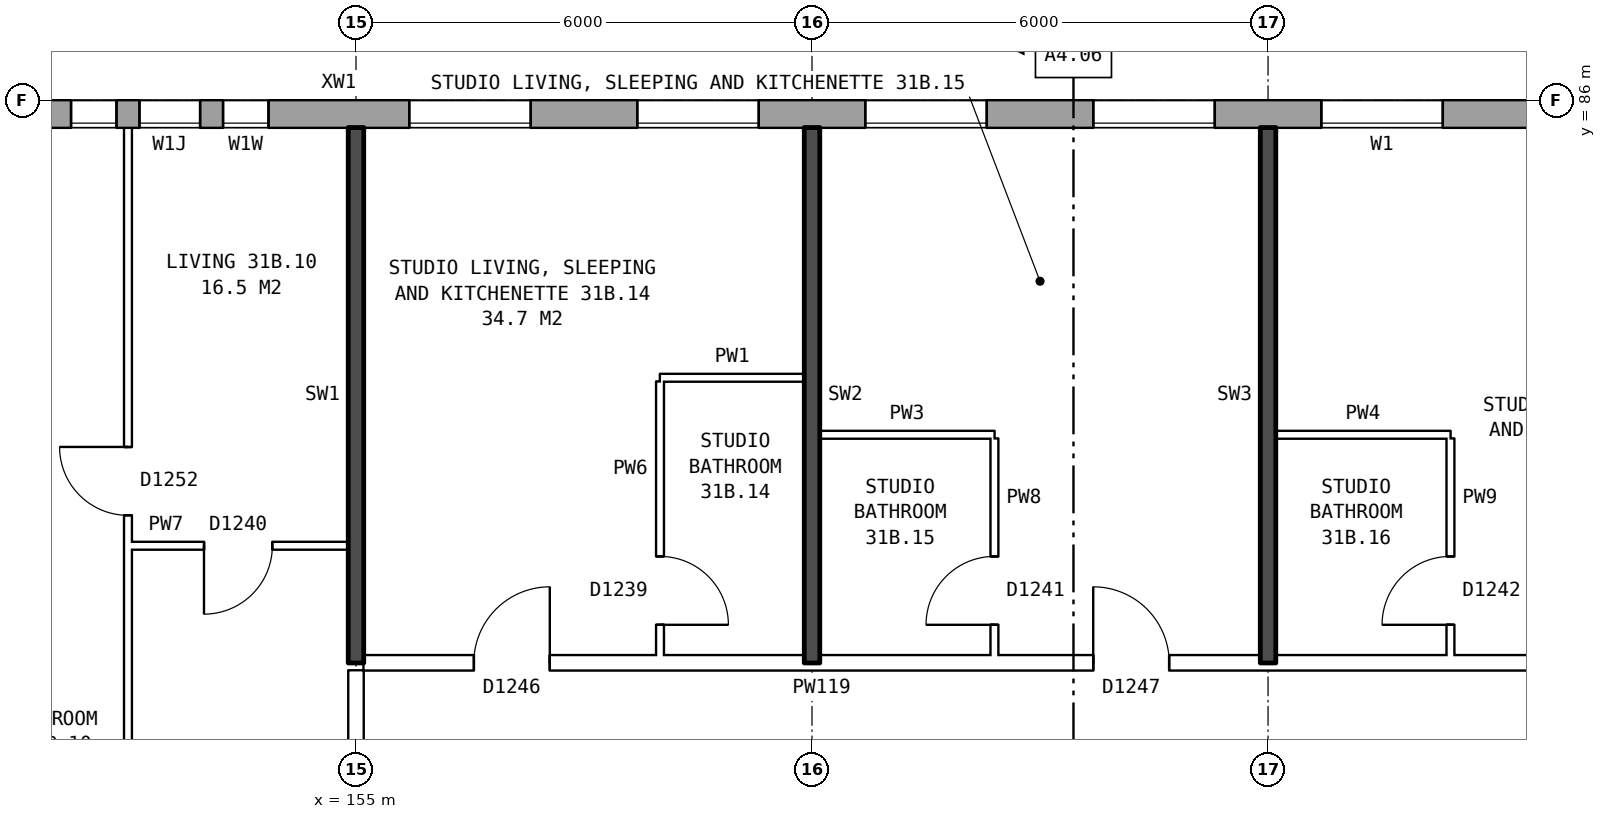
"""IFC4 building model, lengths in metres.
Left out: names, types, materials, properties, quantities, classifications, styles, units other than length and angle.
Written with IfcOpenShell. Run it as: python <this file> out.ifc"""

import sys

from ifc_helpers import new_model, si_unit, direction, frame, frame_2d, origin, place, context, subcontext, project, spatial, rectangle, extrude, element, fill, save


model = new_model("IFC4")
c1 = context("Model", 3, precision=1e-05, world=origin(), true_north=direction((0.0, 1.0)))
c2 = subcontext(c1, "Body", "Model", "MODEL_VIEW")
j1 = project(units=[si_unit("LENGTHUNIT", "METRE"), si_unit("PLANEANGLEUNIT", "RADIAN")], contexts=[c1])
p1 = place(None, origin())
s1 = spatial("IfcSite", under=j1, at=p1, CompositionType="ELEMENT")
p2 = place(p1, origin())
s2 = spatial("IfcBuilding", under=s1, at=p2, CompositionType="ELEMENT")
p3 = place(p2, frame((0.0, 0.0, 111.9)))
s3 = spatial("IfcBuildingStorey", under=s2, at=p3, CompositionType="ELEMENT", Elevation=111.9)
p4 = place(p3, frame((170.925, 85.82, 0.0), z_axis=(0.0, 0.0, 1.0), x_axis=(-1.0, 0.0, 0.0)))
e1 = element("IfcWall", 1, at=p4, inside=s3, PredefinedType="STANDARD", context=c2, shape_type="SweptSolid", body=[
    extrude(rectangle(XDim=36.851, YDim=0.36, at=frame_2d((18.425, 0.0))), origin(), (0.0, 0.0, 1.0), 2.85),
])
p5 = place(p4, frame((1.625, 0.0, 0.8)))
e2 = element("IfcOpeningElement", 2, at=p5, cuts=e1, PredefinedType="OPENING", context=c2, shape_type="SweptSolid", body=[
    extrude(rectangle(XDim=1.6, YDim=1.8, at=frame_2d((0.8, 0.9))), frame((0.0, 0.19, 0.0), z_axis=(0.0, -1.0, 0.0), x_axis=(1.0, 0.0, 0.0)), (0.0, 0.0, 1.0), 0.38),
])
p6 = place(p4, frame((4.625, 0.0, 0.8)))
e3 = element("IfcOpeningElement", 3, at=p6, cuts=e1, PredefinedType="OPENING", context=c2, shape_type="SweptSolid", body=[
    extrude(rectangle(XDim=1.6, YDim=1.8, at=frame_2d((0.8, 0.9))), frame((0.0, 0.19, 0.0), z_axis=(0.0, -1.0, 0.0), x_axis=(1.0, 0.0, 0.0)), (0.0, 0.0, 1.0), 0.38),
])
p7 = place(p4, frame((7.625, 0.0, 0.8)))
e4 = element("IfcOpeningElement", 4, at=p7, cuts=e1, PredefinedType="OPENING", context=c2, shape_type="SweptSolid", body=[
    extrude(rectangle(XDim=1.6, YDim=1.8, at=frame_2d((0.8, 0.9))), frame((0.0, 0.19, 0.0), z_axis=(0.0, -1.0, 0.0), x_axis=(1.0, 0.0, 0.0)), (0.0, 0.0, 1.0), 0.38),
])
p8 = place(p4, frame((10.625, 0.0, 0.8)))
e5 = element("IfcOpeningElement", 5, at=p8, cuts=e1, PredefinedType="OPENING", context=c2, shape_type="SweptSolid", body=[
    extrude(rectangle(XDim=1.6, YDim=1.8, at=frame_2d((0.8, 0.9))), frame((0.0, 0.19, 0.0), z_axis=(0.0, -1.0, 0.0), x_axis=(1.0, 0.0, 0.0)), (0.0, 0.0, 1.0), 0.38),
])
p9 = place(p4, frame((13.625, 0.0, 0.8)))
e6 = element("IfcOpeningElement", 6, at=p9, cuts=e1, PredefinedType="OPENING", context=c2, shape_type="SweptSolid", body=[
    extrude(rectangle(XDim=1.6, YDim=1.8, at=frame_2d((0.8, 0.9))), frame((0.0, 0.19, 0.0), z_axis=(0.0, -1.0, 0.0), x_axis=(1.0, 0.0, 0.0)), (0.0, 0.0, 1.0), 0.38),
])
p10 = place(p4, frame((17.075, 0.0, 0.15)))
e7 = element("IfcOpeningElement", 7, at=p10, cuts=e1, PredefinedType="OPENING", context=c2, shape_type="SweptSolid", body=[
    extrude(rectangle(XDim=0.6, YDim=0.9, at=frame_2d((0.3, 0.45))), frame((0.0, 0.19, 0.0), z_axis=(0.0, -1.0, 0.0), x_axis=(1.0, 0.0, 0.0)), (0.0, 0.0, 1.0), 0.38),
])
p11 = place(p4, frame((19.075, 0.0, 0.25)))
e8 = element("IfcOpeningElement", 8, at=p11, cuts=e1, PredefinedType="OPENING", context=c2, shape_type="SweptSolid", body=[
    extrude(rectangle(XDim=0.6, YDim=0.9, at=frame_2d((0.3, 0.45))), frame((0.0, 0.19, 0.0), z_axis=(0.0, -1.0, 0.0), x_axis=(1.0, 0.0, 0.0)), (0.0, 0.0, 1.0), 0.38),
])
p12 = place(p4, frame((22.625, 0.0, 0.8)))
e9 = element("IfcOpeningElement", 9, at=p12, cuts=e1, PredefinedType="OPENING", context=c2, shape_type="SweptSolid", body=[
    extrude(rectangle(XDim=1.6, YDim=1.8, at=frame_2d((0.8, 0.9))), frame((0.0, 0.19, 0.0), z_axis=(0.0, -1.0, 0.0), x_axis=(1.0, 0.0, 0.0)), (0.0, 0.0, 1.0), 0.38),
])
p13 = place(p4, frame((25.625, 0.0, 0.8)))
e10 = element("IfcOpeningElement", 10, at=p13, cuts=e1, PredefinedType="OPENING", context=c2, shape_type="SweptSolid", body=[
    extrude(rectangle(XDim=1.6, YDim=1.8, at=frame_2d((0.8, 0.9))), frame((0.0, 0.19, 0.0), z_axis=(0.0, -1.0, 0.0), x_axis=(1.0, 0.0, 0.0)), (0.0, 0.0, 1.0), 0.38),
])
p14 = place(p4, frame((28.625, 0.0, 0.8)))
e11 = element("IfcOpeningElement", 11, at=p14, cuts=e1, PredefinedType="OPENING", context=c2, shape_type="SweptSolid", body=[
    extrude(rectangle(XDim=1.6, YDim=1.8, at=frame_2d((0.8, 0.9))), frame((0.0, 0.19, 0.0), z_axis=(0.0, -1.0, 0.0), x_axis=(1.0, 0.0, 0.0)), (0.0, 0.0, 1.0), 0.38),
])
p15 = place(p4, frame((31.625, 0.0, 0.8)))
e12 = element("IfcOpeningElement", 12, at=p15, cuts=e1, PredefinedType="OPENING", context=c2, shape_type="SweptSolid", body=[
    extrude(rectangle(XDim=1.6, YDim=1.8, at=frame_2d((0.8, 0.9))), frame((0.0, 0.19, 0.0), z_axis=(0.0, -1.0, 0.0), x_axis=(1.0, 0.0, 0.0)), (0.0, 0.0, 1.0), 0.38),
])
p16 = place(p4, frame((34.625, 0.0, 0.8)))
e13 = element("IfcOpeningElement", 13, at=p16, cuts=e1, PredefinedType="OPENING", context=c2, shape_type="SweptSolid", body=[
    extrude(rectangle(XDim=1.6, YDim=1.8, at=frame_2d((0.8, 0.9))), frame((0.0, 0.19, 0.0), z_axis=(0.0, -1.0, 0.0), x_axis=(1.0, 0.0, 0.0)), (0.0, 0.0, 1.0), 0.38),
])
p17 = place(p4, frame((17.975, 0.0, 0.25)))
e14 = element("IfcOpeningElement", 14, at=p17, cuts=e1, PredefinedType="OPENING", context=c2, shape_type="SweptSolid", body=[
    extrude(rectangle(XDim=0.8, YDim=1.5, at=frame_2d((0.4, 0.75))), frame((0.0, 0.19, 0.0), z_axis=(0.0, -1.0, 0.0), x_axis=(1.0, 0.0, 0.0)), (0.0, 0.0, 1.0), 0.38),
])
p18 = place(p4, frame((20.525, 0.0, 1.35)))
e15 = element("IfcOpeningElement", 15, at=p18, cuts=e1, PredefinedType="OPENING", context=c2, shape_type="SweptSolid", body=[
    extrude(rectangle(XDim=1.2, YDim=1.2, at=frame_2d((0.6, 0.6))), frame((0.0, 0.19, 0.0), z_axis=(0.0, -1.0, 0.0), x_axis=(1.0, 0.0, 0.0)), (0.0, 0.0, 1.0), 0.38),
])
p19 = place(p3, frame((155.1, 78.6, 0.0), z_axis=(0.0, 0.0, 1.0), x_axis=(1.0, 0.0, 0.0)))
e16 = element("IfcWall", 16, at=p19, inside=s3, PredefinedType="PARTITIONING", context=c2, shape_type="SweptSolid", body=[
    extrude(rectangle(XDim=18.54, YDim=0.2, at=frame_2d((9.27, 0.0))), origin(), (0.0, 0.0, 1.0), 2.85),
])
p20 = place(p19, frame((1.45, 0.0, 0.0)))
e17 = element("IfcOpeningElement", 17, at=p20, cuts=e16, PredefinedType="OPENING", context=c2, shape_type="SweptSolid", body=[
    extrude(rectangle(XDim=1.0, YDim=2.1, at=frame_2d((0.5, 1.05))), frame((0.0, 0.11, 0.0), z_axis=(0.0, -1.0, 0.0), x_axis=(1.0, 0.0, 0.0)), (0.0, 0.0, 1.0), 0.22),
])
p21 = place(p19, frame((9.6, 0.0, 0.0)))
e18 = element("IfcOpeningElement", 18, at=p21, cuts=e16, PredefinedType="OPENING", context=c2, shape_type="SweptSolid", body=[
    extrude(rectangle(XDim=1.0, YDim=2.1, at=frame_2d((0.5, 1.05))), frame((0.0, 0.11, 0.0), z_axis=(0.0, -1.0, 0.0), x_axis=(1.0, 0.0, 0.0)), (0.0, 0.0, 1.0), 0.22),
])
p22 = place(p19, frame((15.92, 0.0, 0.0)))
e19 = element("IfcOpeningElement", 19, at=p22, cuts=e16, PredefinedType="OPENING", context=c2, shape_type="SweptSolid", body=[
    extrude(rectangle(XDim=1.0, YDim=2.1, at=frame_2d((0.5, 1.05))), frame((0.0, 0.11, 0.0), z_axis=(0.0, -1.0, 0.0), x_axis=(1.0, 0.0, 0.0)), (0.0, 0.0, 1.0), 0.22),
])
p23 = place(p3, frame((152.0, 80.14, 0.0), z_axis=(0.0, 0.0, 1.0), x_axis=(1.0, 0.0, 0.0)))
e20 = element("IfcWall", 20, at=p23, inside=s3, PredefinedType="PARTITIONING", context=c2, shape_type="SweptSolid", body=[
    extrude(rectangle(XDim=2.9, YDim=0.1, at=frame_2d((1.45, 0.0))), origin(), (0.0, 0.0, 1.0), 2.85),
])
p24 = place(p23, frame((1.0, 0.0, 0.0)))
e21 = element("IfcOpeningElement", 21, at=p24, cuts=e20, PredefinedType="OPENING", context=c2, shape_type="SweptSolid", body=[
    extrude(rectangle(XDim=0.9, YDim=2.1, at=frame_2d((0.45, 1.05))), frame((0.0, 0.06, 0.0), z_axis=(0.0, -1.0, 0.0), x_axis=(1.0, 0.0, 0.0)), (0.0, 0.0, 1.0), 0.12),
])
for number, where, z_axis, x_axis in (
    (22, (161.1, 81.6, 0.0), (0.0, 0.0, 1.0), (1.0, 0.0, 0.0)),
    (23, (167.1, 81.6, 0.0), (0.0, 0.0, 1.0), (1.0, 0.0, 0.0)),
):
    element("IfcWall", number, at=place(p3, frame(where, z_axis=z_axis, x_axis=x_axis)), inside=s3, PredefinedType="PARTITIONING", context=c2, shape_type="SweptSolid", body=[
        extrude(rectangle(XDim=2.3, YDim=0.1, at=frame_2d((1.15, 0.0))), origin(), (0.0, 0.0, 1.0), 2.85),
    ])
p25 = place(p3, frame((159.0, 82.35, 0.0), z_axis=(0.0, 0.0, 1.0), x_axis=(1.0, 0.0, 0.0)))
e24 = element("IfcWall", 24, at=p25, inside=s3, PredefinedType="PARTITIONING", context=c2, shape_type="SweptSolid", body=[
    extrude(rectangle(XDim=1.9, YDim=0.1, at=frame_2d((0.95, 0.0))), origin(), (0.0, 0.0, 1.0), 2.85),
])
p26 = place(p3, frame((152.0, 71.3, 0.0), z_axis=(0.0, 0.0, 1.0), x_axis=(0.0, 1.0, 0.0)))
e25 = element("IfcWall", 25, at=p26, inside=s3, PredefinedType="PARTITIONING", context=c2, shape_type="SweptSolid", body=[
    extrude(rectangle(XDim=14.34, YDim=0.1, at=frame_2d((7.17, 0.0))), origin(), (0.0, 0.0, 1.0), 2.85),
])
p27 = place(p26, frame((9.24, 0.0, 0.0)))
e26 = element("IfcOpeningElement", 26, at=p27, cuts=e25, PredefinedType="OPENING", context=c2, shape_type="SweptSolid", body=[
    extrude(rectangle(XDim=0.9, YDim=2.1, at=frame_2d((0.45, 1.05))), frame((0.0, 0.06, 0.0), z_axis=(0.0, -1.0, 0.0), x_axis=(1.0, 0.0, 0.0)), (0.0, 0.0, 1.0), 0.12),
])
p28 = place(p26, frame((0.4, 0.0, 0.0)))
e27 = element("IfcOpeningElement", 27, at=p28, cuts=e25, PredefinedType="OPENING", context=c2, shape_type="SweptSolid", body=[
    extrude(rectangle(XDim=0.9, YDim=2.1, at=frame_2d((0.45, 1.05))), frame((0.0, 0.06, 0.0), z_axis=(0.0, -1.0, 0.0), x_axis=(1.0, 0.0, 0.0)), (0.0, 0.0, 1.0), 0.12),
])
p29 = place(p3, frame((155.0, 76.3, 0.0), z_axis=(0.0, 0.0, 1.0), x_axis=(0.0, 1.0, 0.0)))
e28 = element("IfcWall", 28, at=p29, inside=s3, PredefinedType="PARTITIONING", context=c2, shape_type="SweptSolid", body=[
    extrude(rectangle(XDim=2.2, YDim=0.2, at=frame_2d((1.1, 0.0))), origin(), (0.0, 0.0, 1.0), 2.85),
])
p30 = place(p3, frame((155.0, 78.6, 0.0), z_axis=(0.0, 0.0, 1.0), x_axis=(0.0, 1.0, 0.0)))
e29 = element("IfcWall", 29, at=p30, inside=s3, PredefinedType="SOLIDWALL", context=c2, shape_type="SweptSolid", body=[
    extrude(rectangle(XDim=7.04, YDim=0.2, at=frame_2d((3.52, 0.0))), origin(), (0.0, 0.0, 1.0), 2.85),
])
p31 = place(p3, frame((159.0, 78.7, 0.0), z_axis=(0.0, 0.0, 1.0), x_axis=(0.0, 1.0, 0.0)))
e30 = element("IfcWall", 30, at=p31, inside=s3, PredefinedType="PARTITIONING", context=c2, shape_type="SweptSolid", body=[
    extrude(rectangle(XDim=3.6, YDim=0.1, at=frame_2d((1.8, 0.0))), origin(), (0.0, 0.0, 1.0), 2.85),
])
p32 = place(p31, frame((0.4, 0.0, 0.0)))
e31 = element("IfcOpeningElement", 31, at=p32, cuts=e30, PredefinedType="OPENING", context=c2, shape_type="SweptSolid", body=[
    extrude(rectangle(XDim=0.9, YDim=2.1, at=frame_2d((0.45, 1.05))), frame((0.0, 0.06, 0.0), z_axis=(0.0, -1.0, 0.0), x_axis=(1.0, 0.0, 0.0)), (0.0, 0.0, 1.0), 0.12),
])
p33 = place(p3, frame((161.0, 78.6, 0.0), z_axis=(0.0, 0.0, 1.0), x_axis=(0.0, 1.0, 0.0)))
e32 = element("IfcWall", 32, at=p33, inside=s3, PredefinedType="SOLIDWALL", context=c2, shape_type="SweptSolid", body=[
    extrude(rectangle(XDim=7.04, YDim=0.2, at=frame_2d((3.52, 0.0))), origin(), (0.0, 0.0, 1.0), 2.85),
])
p34 = place(p3, frame((163.4, 78.7, 0.0), z_axis=(0.0, 0.0, 1.0), x_axis=(0.0, 1.0, 0.0)))
e33 = element("IfcWall", 33, at=p34, inside=s3, PredefinedType="PARTITIONING", context=c2, shape_type="SweptSolid", body=[
    extrude(rectangle(XDim=2.85, YDim=0.1, at=frame_2d((1.425, 0.0))), origin(), (0.0, 0.0, 1.0), 2.85),
])
p35 = place(p34, frame((0.4, 0.0, 0.0)))
e34 = element("IfcOpeningElement", 34, at=p35, cuts=e33, PredefinedType="OPENING", context=c2, shape_type="SweptSolid", body=[
    extrude(rectangle(XDim=0.9, YDim=2.1, at=frame_2d((0.45, 1.05))), frame((0.0, 0.06, 0.0), z_axis=(0.0, -1.0, 0.0), x_axis=(1.0, 0.0, 0.0)), (0.0, 0.0, 1.0), 0.12),
])
p36 = place(p3, frame((167.0, 78.6, 0.0), z_axis=(0.0, 0.0, 1.0), x_axis=(0.0, 1.0, 0.0)))
e35 = element("IfcWall", 35, at=p36, inside=s3, PredefinedType="SOLIDWALL", context=c2, shape_type="SweptSolid", body=[
    extrude(rectangle(XDim=7.04, YDim=0.2, at=frame_2d((3.52, 0.0))), origin(), (0.0, 0.0, 1.0), 2.85),
])
p37 = place(p3, frame((169.4, 78.7, 0.0), z_axis=(0.0, 0.0, 1.0), x_axis=(0.0, 1.0, 0.0)))
e36 = element("IfcWall", 36, at=p37, inside=s3, PredefinedType="PARTITIONING", context=c2, shape_type="SweptSolid", body=[
    extrude(rectangle(XDim=2.85, YDim=0.1, at=frame_2d((1.425, 0.0))), origin(), (0.0, 0.0, 1.0), 2.85),
])
p38 = place(p37, frame((0.4, 0.0, 0.0)))
e37 = element("IfcOpeningElement", 37, at=p38, cuts=e36, PredefinedType="OPENING", context=c2, shape_type="SweptSolid", body=[
    extrude(rectangle(XDim=0.9, YDim=2.1, at=frame_2d((0.45, 1.05))), frame((0.0, 0.06, 0.0), z_axis=(0.0, -1.0, 0.0), x_axis=(1.0, 0.0, 0.0)), (0.0, 0.0, 1.0), 0.12),
])
p39 = place(p5, origin())
e38 = element("IfcWindow", 38, at=p39, inside=s3, PartitioningType="SINGLE_PANEL", PredefinedType="WINDOW", context=c2, shape_type="SweptSolid", body=[
    extrude(rectangle(XDim=1.6, YDim=1.8, at=frame_2d((0.8, 0.9))), frame((0.0, 0.15, 0.0), z_axis=(0.0, -1.0, 0.0), x_axis=(1.0, 0.0, 0.0)), (0.0, 0.0, 1.0), 0.06),
])
fill(e2, e38)
p40 = place(p6, origin())
e39 = element("IfcWindow", 39, at=p40, inside=s3, PartitioningType="SINGLE_PANEL", PredefinedType="WINDOW", context=c2, shape_type="SweptSolid", body=[
    extrude(rectangle(XDim=1.6, YDim=1.8, at=frame_2d((0.8, 0.9))), frame((0.0, 0.15, 0.0), z_axis=(0.0, -1.0, 0.0), x_axis=(1.0, 0.0, 0.0)), (0.0, 0.0, 1.0), 0.06),
])
fill(e3, e39)
p41 = place(p7, origin())
e40 = element("IfcWindow", 40, at=p41, inside=s3, PartitioningType="SINGLE_PANEL", PredefinedType="WINDOW", context=c2, shape_type="SweptSolid", body=[
    extrude(rectangle(XDim=1.6, YDim=1.8, at=frame_2d((0.8, 0.9))), frame((0.0, 0.15, 0.0), z_axis=(0.0, -1.0, 0.0), x_axis=(1.0, 0.0, 0.0)), (0.0, 0.0, 1.0), 0.06),
])
fill(e4, e40)
p42 = place(p8, origin())
e41 = element("IfcWindow", 41, at=p42, inside=s3, PartitioningType="SINGLE_PANEL", PredefinedType="WINDOW", context=c2, shape_type="SweptSolid", body=[
    extrude(rectangle(XDim=1.6, YDim=1.8, at=frame_2d((0.8, 0.9))), frame((0.0, 0.15, 0.0), z_axis=(0.0, -1.0, 0.0), x_axis=(1.0, 0.0, 0.0)), (0.0, 0.0, 1.0), 0.06),
])
fill(e5, e41)
p43 = place(p9, origin())
e42 = element("IfcWindow", 42, at=p43, inside=s3, PartitioningType="SINGLE_PANEL", PredefinedType="WINDOW", context=c2, shape_type="SweptSolid", body=[
    extrude(rectangle(XDim=1.6, YDim=1.8, at=frame_2d((0.8, 0.9))), frame((0.0, 0.15, 0.0), z_axis=(0.0, -1.0, 0.0), x_axis=(1.0, 0.0, 0.0)), (0.0, 0.0, 1.0), 0.06),
])
fill(e6, e42)
p44 = place(p10, origin())
e43 = element("IfcWindow", 43, at=p44, inside=s3, PartitioningType="SINGLE_PANEL", PredefinedType="WINDOW", context=c2, shape_type="SweptSolid", body=[
    extrude(rectangle(XDim=0.6, YDim=0.9, at=frame_2d((0.3, 0.45))), frame((0.0, 0.15, 0.0), z_axis=(0.0, -1.0, 0.0), x_axis=(1.0, 0.0, 0.0)), (0.0, 0.0, 1.0), 0.06),
])
fill(e7, e43)
p45 = place(p11, origin())
e44 = element("IfcWindow", 44, at=p45, inside=s3, PartitioningType="SINGLE_PANEL", PredefinedType="WINDOW", context=c2, shape_type="SweptSolid", body=[
    extrude(rectangle(XDim=0.6, YDim=0.9, at=frame_2d((0.3, 0.45))), frame((0.0, 0.15, 0.0), z_axis=(0.0, -1.0, 0.0), x_axis=(1.0, 0.0, 0.0)), (0.0, 0.0, 1.0), 0.06),
])
fill(e8, e44)
p46 = place(p27, origin())
e45 = element("IfcDoor", 45, at=p46, inside=s3, OperationType="SINGLE_SWING_RIGHT", PredefinedType="DOOR", context=c2, shape_type="SweptSolid", body=[
    extrude(rectangle(XDim=0.9, YDim=2.1, at=frame_2d((0.45, 1.05))), frame((0.0, 0.025, 0.0), z_axis=(0.0, -1.0, 0.0), x_axis=(1.0, 0.0, 0.0)), (0.0, 0.0, 1.0), 0.05),
])
fill(e26, e45)
p47 = place(p24, frame((0.9, 0.0, 0.0), z_axis=(0.0, 0.0, 1.0), x_axis=(-1.0, 0.0, 0.0)))
e46 = element("IfcDoor", 46, at=p47, inside=s3, OperationType="SINGLE_SWING_RIGHT", PredefinedType="DOOR", context=c2, shape_type="SweptSolid", body=[
    extrude(rectangle(XDim=0.9, YDim=2.1, at=frame_2d((0.45, 1.05))), frame((0.0, 0.025, 0.0), z_axis=(0.0, -1.0, 0.0), x_axis=(1.0, 0.0, 0.0)), (0.0, 0.0, 1.0), 0.05),
])
fill(e21, e46)
p48 = place(p20, origin())
e47 = element("IfcDoor", 47, at=p48, inside=s3, OperationType="SINGLE_SWING_RIGHT", PredefinedType="DOOR", context=c2, shape_type="SweptSolid", body=[
    extrude(rectangle(XDim=1.0, YDim=2.1, at=frame_2d((0.5, 1.05))), frame((0.0, 0.025, 0.0), z_axis=(0.0, -1.0, 0.0), x_axis=(1.0, 0.0, 0.0)), (0.0, 0.0, 1.0), 0.05),
])
fill(e17, e47)
p49 = place(p32, frame((0.9, 0.0, 0.0), z_axis=(0.0, 0.0, 1.0), x_axis=(-1.0, 0.0, 0.0)))
e48 = element("IfcDoor", 48, at=p49, inside=s3, OperationType="SINGLE_SWING_RIGHT", PredefinedType="DOOR", context=c2, shape_type="SweptSolid", body=[
    extrude(rectangle(XDim=0.9, YDim=2.1, at=frame_2d((0.45, 1.05))), frame((0.0, 0.025, 0.0), z_axis=(0.0, -1.0, 0.0), x_axis=(1.0, 0.0, 0.0)), (0.0, 0.0, 1.0), 0.05),
])
fill(e31, e48)
p50 = place(p21, origin())
e49 = element("IfcDoor", 49, at=p50, inside=s3, OperationType="SINGLE_SWING_LEFT", PredefinedType="DOOR", context=c2, shape_type="SweptSolid", body=[
    extrude(rectangle(XDim=1.0, YDim=2.1, at=frame_2d((0.5, 1.05))), frame((0.0, 0.025, 0.0), z_axis=(0.0, -1.0, 0.0), x_axis=(1.0, 0.0, 0.0)), (0.0, 0.0, 1.0), 0.05),
])
fill(e18, e49)
p51 = place(p35, origin())
e50 = element("IfcDoor", 50, at=p51, inside=s3, OperationType="SINGLE_SWING_LEFT", PredefinedType="DOOR", context=c2, shape_type="SweptSolid", body=[
    extrude(rectangle(XDim=0.9, YDim=2.1, at=frame_2d((0.45, 1.05))), frame((0.0, 0.025, 0.0), z_axis=(0.0, -1.0, 0.0), x_axis=(1.0, 0.0, 0.0)), (0.0, 0.0, 1.0), 0.05),
])
fill(e34, e50)
p52 = place(p38, origin())
e51 = element("IfcDoor", 51, at=p52, inside=s3, OperationType="SINGLE_SWING_LEFT", PredefinedType="DOOR", context=c2, shape_type="SweptSolid", body=[
    extrude(rectangle(XDim=0.9, YDim=2.1, at=frame_2d((0.45, 1.05))), frame((0.0, 0.025, 0.0), z_axis=(0.0, -1.0, 0.0), x_axis=(1.0, 0.0, 0.0)), (0.0, 0.0, 1.0), 0.05),
])
fill(e37, e51)
p53 = place(p17, origin())
e52 = element("IfcWindow", 52, at=p53, inside=s3, PartitioningType="SINGLE_PANEL", PredefinedType="WINDOW", context=c2, shape_type="SweptSolid", body=[
    extrude(rectangle(XDim=0.8, YDim=1.5, at=frame_2d((0.4, 0.75))), frame((0.0, 0.15, 0.0), z_axis=(0.0, -1.0, 0.0), x_axis=(1.0, 0.0, 0.0)), (0.0, 0.0, 1.0), 0.06),
])
fill(e14, e52)
save(model, sys.argv[1])
